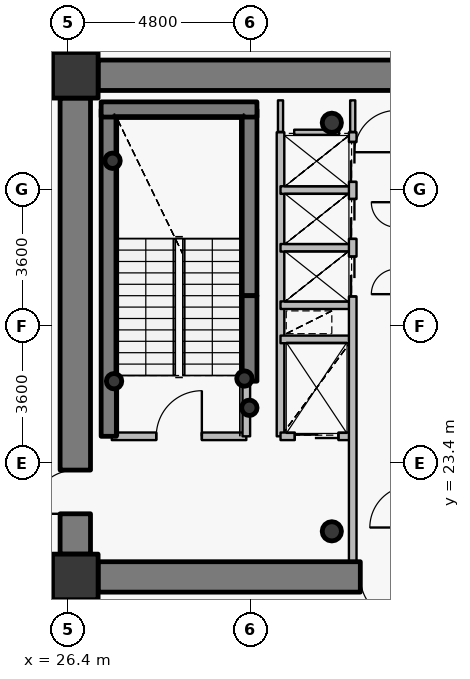
"""IFC4 building model, lengths in metres.
Left out: names, types, materials, properties, quantities, classifications, styles, units other than length and angle.
Written with IfcOpenShell. Run it as: python <this file> out.ifc"""

import sys

from ifc_helpers import new_model, si_unit, direction, frame, frame_2d, origin, origin_2d, place, context, subcontext, project, spatial, rectangle, hollow_circle, extrude, source, transform, mapped, element, fill, save


model = new_model("IFC4")
c1 = context("Model", 3, precision=1e-05, world=origin(), true_north=direction((0.0, 1.0)))
c2 = subcontext(c1, "Body", "Model", "MODEL_VIEW")
j1 = project(units=[si_unit("LENGTHUNIT", "METRE"), si_unit("PLANEANGLEUNIT", "RADIAN")], contexts=[c1])
p1 = place(None, origin())
s1 = spatial("IfcSite", under=j1, at=p1, CompositionType="ELEMENT")
p2 = place(p1, origin())
s2 = spatial("IfcBuilding", under=s1, at=p2, CompositionType="ELEMENT")
p3 = place(p2, frame((0.0, 0.0, 178.65)))
s3 = spatial("IfcBuildingStorey", under=s2, at=p3, CompositionType="ELEMENT", Elevation=178.65)
for number, where, z_axis, x_axis in (
    (1, (26.6, 20.4, 0.0), (0.0, 0.0, 1.0), (1.0, 0.0, 0.0)),
    (2, (26.6, 33.6, 0.0), (0.0, 0.0, 1.0), (1.0, 0.0, 0.0)),
):
    element("IfcColumn", number, at=place(p3, frame(where, z_axis=z_axis, x_axis=x_axis)), inside=s3, PredefinedType="COLUMN", context=c2, shape_type="SweptSolid", body=[
        extrude(rectangle(XDim=1.2, YDim=1.2, at=origin_2d()), origin(), (0.0, 0.0, 1.0), 3.75),
    ])
for number, where, z_axis, x_axis in (
    (3, (33.35, 21.6, 0.0), (0.0, 0.0, 1.0), (1.0, 0.0, 0.0)),
    (4, (33.35, 32.35, 0.0), (0.0, 0.0, 1.0), (1.0, 0.0, 0.0)),
):
    element("IfcColumn", number, at=place(p3, frame(where, z_axis=z_axis, x_axis=x_axis)), inside=s3, PredefinedType="COLUMN", context=c2, shape_type="SweptSolid", body=[
        extrude(hollow_circle(Radius=0.254, WallThickness=0.02, at=origin_2d()), origin(), (0.0, 0.0, 1.0), 3.75),
    ])
p4 = place(p3, frame((27.48, 24.1, 0.0), z_axis=(0.0, 0.0, 1.0), x_axis=(0.0, 1.0, 0.0)))
e5 = element("IfcWall", 5, at=p4, inside=s3, PredefinedType="SHEAR", context=c2, shape_type="SweptSolid", body=[
    extrude(rectangle(XDim=8.6, YDim=0.4, at=frame_2d((4.3, 0.0))), origin(), (0.0, 0.0, 1.0), 3.75),
])
p5 = place(p3, frame((31.18, 27.8, 0.0), z_axis=(0.0, 0.0, 1.0), x_axis=(0.0, 1.0, 0.0)))
e6 = element("IfcWall", 6, at=p5, inside=s3, PredefinedType="SHEAR", context=c2, shape_type="SweptSolid", body=[
    extrude(rectangle(XDim=4.9, YDim=0.4, at=frame_2d((2.45, 0.0))), origin(), (0.0, 0.0, 1.0), 3.75),
])
p6 = place(p3, frame((27.28, 32.7, 0.0), z_axis=(0.0, 0.0, 1.0), x_axis=(1.0, 0.0, 0.0)))
e7 = element("IfcWall", 7, at=p6, inside=s3, PredefinedType="SHEAR", context=c2, shape_type="SweptSolid", body=[
    extrude(rectangle(XDim=4.1, YDim=0.4, at=frame_2d((2.05, 0.0))), origin(), (0.0, 0.0, 1.0), 3.75),
])
for number, where, z_axis, x_axis in (
    (8, (27.58, 31.35, 0.0), (0.0, 0.0, 1.0), (1.0, 0.0, 0.0)),
    (9, (31.05, 25.62, 0.0), (0.0, 0.0, 1.0), (1.0, 0.0, 0.0)),
    (10, (31.18, 24.85, 0.0), (0.0, 0.0, 1.0), (1.0, 0.0, 0.0)),
    (11, (27.62, 25.55, 0.0), (0.0, 0.0, 1.0), (1.0, 0.0, 0.0)),
):
    element("IfcColumn", number, at=place(p3, frame(where, z_axis=z_axis, x_axis=x_axis)), inside=s3, PredefinedType="COLUMN", context=c2, shape_type="SweptSolid", body=[
        extrude(hollow_circle(Radius=0.203, WallThickness=0.016, at=origin_2d()), origin(), (0.0, 0.0, 1.0), 3.75),
    ])
p7 = place(p3, frame((27.2, 33.6, 0.0), z_axis=(0.0, 0.0, 1.0), x_axis=(1.0, 0.0, 0.0)))
e12 = element("IfcWall", 12, at=p7, inside=s3, PredefinedType="SHEAR", context=c2, shape_type="SweptSolid", body=[
    extrude(rectangle(XDim=17.6, YDim=0.8, at=frame_2d((8.8, 0.0))), origin(), (0.0, 0.0, 1.0), 2.95),
])
p8 = place(p7, frame((13.45, 0.0, 0.0)))
e13 = element("IfcOpeningElement", 13, at=p8, cuts=e12, PredefinedType="OPENING", context=c2, shape_type="SweptSolid", body=[
    extrude(rectangle(XDim=1.15, YDim=2.15, at=origin_2d()), frame((0.575, 0.41, 1.075), z_axis=(0.0, -1.0, 0.0), x_axis=(1.0, 0.0, 0.0)), (0.0, 0.0, 1.0), 0.82),
])
p9 = place(p3, frame((44.8, 20.4, 0.0), z_axis=(0.0, 0.0, 1.0), x_axis=(-1.0, 0.0, 0.0)))
e14 = element("IfcWall", 14, at=p9, inside=s3, PredefinedType="SHEAR", context=c2, shape_type="SweptSolid", body=[
    extrude(rectangle(XDim=17.6, YDim=0.8, at=frame_2d((8.8, 0.0))), origin(), (0.0, 0.0, 1.0), 2.95),
])
p10 = place(p9, frame((9.55, 0.0, 0.0)))
e15 = element("IfcOpeningElement", 15, at=p10, cuts=e14, PredefinedType="OPENING", context=c2, shape_type="SweptSolid", body=[
    extrude(rectangle(XDim=1.15, YDim=2.15, at=origin_2d()), frame((0.575, 0.41, 1.075), z_axis=(0.0, -1.0, 0.0), x_axis=(1.0, 0.0, 0.0)), (0.0, 0.0, 1.0), 0.82),
])
p11 = place(p3, frame((26.6, 21.0, 0.0), z_axis=(0.0, 0.0, 1.0), x_axis=(0.0, 1.0, 0.0)))
e16 = element("IfcWall", 16, at=p11, inside=s3, PredefinedType="SHEAR", context=c2, shape_type="SweptSolid", body=[
    extrude(rectangle(XDim=12.0, YDim=0.8, at=frame_2d((6.0, 0.0))), origin(), (0.0, 0.0, 1.0), 2.95),
])
p12 = place(p11, frame((1.061, 0.0, 0.0)))
e17 = element("IfcOpeningElement", 17, at=p12, cuts=e16, PredefinedType="OPENING", context=c2, shape_type="SweptSolid", body=[
    extrude(rectangle(XDim=1.15, YDim=2.15, at=origin_2d()), frame((0.575, 0.41, 1.075), z_axis=(0.0, -1.0, 0.0), x_axis=(1.0, 0.0, 0.0)), (0.0, 0.0, 1.0), 0.82),
])
p13 = place(p3, frame((31.18, 25.55, 0.0), z_axis=(0.0, 0.0, 1.0), x_axis=(0.0, 1.0, 0.0)))
e18 = element("IfcWall", 18, at=p13, inside=s3, PredefinedType="SHEAR", context=c2, shape_type="SweptSolid", body=[
    extrude(rectangle(XDim=2.25, YDim=0.4, at=frame_2d((1.125, 0.0))), origin(), (0.0, 0.0, 1.0), 3.1),
])
p14 = place(p3, frame((27.56, 24.1, 0.0), z_axis=(0.0, 0.0, 1.0), x_axis=(1.0, 0.0, 0.0)))
e19 = element("IfcWall", 19, at=p14, inside=s3, PredefinedType="PARTITIONING", context=c2, shape_type="SweptSolid", body=[
    extrude(rectangle(XDim=3.54, YDim=0.2, at=frame_2d((1.77, 0.0))), origin(), (0.0, 0.0, 1.0), 3.5),
])
p15 = place(p14, frame((1.17, 0.0, 0.0)))
e20 = element("IfcOpeningElement", 20, at=p15, cuts=e19, PredefinedType="OPENING", context=c2, shape_type="SweptSolid", body=[
    extrude(rectangle(XDim=1.2, YDim=2.15, at=origin_2d()), frame((0.6, 0.11, 1.075), z_axis=(0.0, -1.0, 0.0), x_axis=(1.0, 0.0, 0.0)), (0.0, 0.0, 1.0), 0.22),
])
p16 = place(p3, frame((31.1, 24.1, 0.0), z_axis=(0.0, 0.0, 1.0), x_axis=(0.0, 1.0, 0.0)))
e21 = element("IfcWall", 21, at=p16, inside=s3, PredefinedType="PARTITIONING", context=c2, shape_type="SweptSolid", body=[
    extrude(rectangle(XDim=1.44, YDim=0.2, at=frame_2d((0.72, 0.0))), origin(), (0.0, 0.0, 1.0), 3.5),
])
p17 = place(p3, frame((32.0, 24.1, 0.0), z_axis=(0.0, 0.0, 1.0), x_axis=(0.0, 1.0, 0.0)))
e22 = element("IfcWall", 22, at=p17, inside=s3, PredefinedType="PARTITIONING", context=c2, shape_type="SweptSolid", body=[
    extrude(rectangle(XDim=8.0, YDim=0.2, at=frame_2d((4.0, 0.0))), origin(), (0.0, 0.0, 1.0), 3.5),
])
p18 = place(p3, frame((32.0, 24.1, 0.0), z_axis=(0.0, 0.0, 1.0), x_axis=(1.0, 0.0, 0.0)))
e23 = element("IfcWall", 23, at=p18, inside=s3, PredefinedType="PARTITIONING", context=c2, shape_type="SweptSolid", body=[
    extrude(rectangle(XDim=1.9, YDim=0.2, at=frame_2d((0.95, 0.0))), origin(), (0.0, 0.0, 1.0), 3.085),
])
p19 = place(p18, frame((0.375, 0.0, 0.0)))
e24 = element("IfcOpeningElement", 24, at=p19, cuts=e23, PredefinedType="OPENING", context=c2, shape_type="SweptSolid", body=[
    extrude(rectangle(XDim=1.15, YDim=2.15, at=origin_2d()), frame((0.575, 0.11, 1.075), z_axis=(0.0, -1.0, 0.0), x_axis=(1.0, 0.0, 0.0)), (0.0, 0.0, 1.0), 0.22),
])
for number, where, z_axis, x_axis in (
    (25, (32.0, 26.65, 0.0), (0.0, 0.0, 1.0), (1.0, 0.0, 0.0)),
    (26, (32.0, 27.55, 0.0), (0.0, 0.0, 1.0), (1.0, 0.0, 0.0)),
    (27, (32.0, 29.06, 0.0), (0.0, 0.0, 1.0), (1.0, 0.0, 0.0)),
    (28, (32.0, 30.58, 0.0), (0.0, 0.0, 1.0), (1.0, 0.0, 0.0)),
):
    element("IfcWall", number, at=place(p3, frame(where, z_axis=z_axis, x_axis=x_axis)), inside=s3, PredefinedType="PARTITIONING", context=c2, shape_type="SweptSolid", body=[
        extrude(rectangle(XDim=1.9, YDim=0.2, at=frame_2d((0.95, 0.0))), origin(), (0.0, 0.0, 1.0), 3.085),
    ])
p20 = place(p3, frame((33.9, 20.8, 0.0), z_axis=(0.0, 0.0, 1.0), x_axis=(0.0, 1.0, 0.0)))
e29 = element("IfcWall", 29, at=p20, inside=s3, PredefinedType="PARTITIONING", context=c2, shape_type="SweptSolid", body=[
    extrude(rectangle(XDim=11.3, YDim=0.2, at=frame_2d((5.65, 0.0))), origin(), (0.0, 0.0, 1.0), 3.085),
])
p21 = place(p20, frame((6.98, 0.0, 0.0)))
e30 = element("IfcOpeningElement", 30, at=p21, cuts=e29, PredefinedType="OPENING", context=c2, shape_type="SweptSolid", body=[
    extrude(rectangle(XDim=1.05, YDim=2.15, at=origin_2d()), frame((0.525, 0.11, 1.075), z_axis=(0.0, -1.0, 0.0), x_axis=(1.0, 0.0, 0.0)), (0.0, 0.0, 1.0), 0.22),
])
p22 = place(p20, frame((8.495, 0.0, 0.0)))
e31 = element("IfcOpeningElement", 31, at=p22, cuts=e29, PredefinedType="OPENING", context=c2, shape_type="SweptSolid", body=[
    extrude(rectangle(XDim=1.05, YDim=2.15, at=origin_2d()), frame((0.525, 0.11, 1.075), z_axis=(0.0, -1.0, 0.0), x_axis=(1.0, 0.0, 0.0)), (0.0, 0.0, 1.0), 0.22),
])
p23 = place(p20, frame((9.995, 0.0, 0.0)))
e32 = element("IfcOpeningElement", 32, at=p23, cuts=e29, PredefinedType="OPENING", context=c2, shape_type="SweptSolid", body=[
    extrude(rectangle(XDim=1.05, YDim=2.15, at=origin_2d()), frame((0.525, 0.11, 1.075), z_axis=(0.0, -1.0, 0.0), x_axis=(1.0, 0.0, 0.0)), (0.0, 0.0, 1.0), 0.22),
])
p24 = place(p3, frame((32.36, 32.1, 0.0), z_axis=(0.0, 0.0, 1.0), x_axis=(1.0, 0.0, 0.0)))
e33 = element("IfcWall", 33, at=p24, inside=s3, PredefinedType="PARTITIONING", context=c2, shape_type="SweptSolid", body=[
    extrude(rectangle(XDim=1.18, YDim=0.135, at=frame_2d((0.59, 0.0))), origin(), (0.0, 0.0, 1.0), 3.085),
])
p25 = place(p3, frame((32.0, 32.94, 0.0), z_axis=(0.0, 0.0, 1.0), x_axis=(0.0, -1.0, 0.0)))
e34 = element("IfcWall", 34, at=p25, inside=s3, PredefinedType="PARTITIONING", context=c2, shape_type="SweptSolid", body=[
    extrude(rectangle(XDim=0.83, YDim=0.135, at=frame_2d((0.415, 0.0))), origin(), (0.0, 0.0, 1.0), 3.035),
])
p26 = place(p3, frame((33.9, 32.11, 0.0), z_axis=(0.0, 0.0, 1.0), x_axis=(0.0, 1.0, 0.0)))
e35 = element("IfcWall", 35, at=p26, inside=s3, PredefinedType="PARTITIONING", context=c2, shape_type="SweptSolid", body=[
    extrude(rectangle(XDim=0.83, YDim=0.135, at=frame_2d((0.415, 0.0))), origin(), (0.0, 0.0, 1.0), 3.085),
])
p27 = place(p3, frame((27.19, 34.0, 0.0), z_axis=(0.0, 0.0, 1.0), x_axis=(-1.0, 0.0, 0.0)))
e36 = element("IfcWall", 36, at=p27, inside=s3, PredefinedType="PARTITIONING", context=c2, shape_type="SweptSolid", body=[
    extrude(rectangle(XDim=0.99, YDim=0.135, at=frame_2d((0.495, 0.0))), origin(), (0.0, 0.0, 1.0), 2.935),
])
p28 = place(p3, frame((26.2, 33.692, 0.0), z_axis=(0.0, 0.0, 1.0), x_axis=(0.0, -1.0, 0.0)))
e37 = element("IfcWall", 37, at=p28, inside=s3, PredefinedType="PARTITIONING", context=c2, shape_type="SweptSolid", body=[
    extrude(rectangle(XDim=0.682, YDim=0.135, at=frame_2d((0.341, 0.0))), origin(), (0.0, 0.0, 1.0), 3.5),
])
p29 = place(p3, frame((26.2, 20.99, 0.0), z_axis=(0.0, 0.0, 1.0), x_axis=(0.0, -1.0, 0.0)))
e38 = element("IfcWall", 38, at=p29, inside=s3, PredefinedType="PARTITIONING", context=c2, shape_type="SweptSolid", body=[
    extrude(rectangle(XDim=0.99, YDim=0.135, at=frame_2d((0.495, 0.0))), origin(), (0.0, 0.0, 1.0), 3.5),
])
p30 = place(p3, frame((26.508, 20.0, 0.0), z_axis=(0.0, 0.0, 1.0), x_axis=(1.0, 0.0, 0.0)))
e39 = element("IfcWall", 39, at=p30, inside=s3, PredefinedType="PARTITIONING", context=c2, shape_type="SweptSolid", body=[
    extrude(rectangle(XDim=0.682, YDim=0.135, at=frame_2d((0.341, 0.0))), origin(), (0.0, 0.0, 1.0), 2.935),
])
m1 = source(origin(), c2, "Body", "SweptSolid", [
    extrude(rectangle(XDim=1.15, YDim=2.15, at=origin_2d()), frame((0.575, 0.025, 1.075), z_axis=(0.0, -1.0, 0.0), x_axis=(1.0, 0.0, 0.0)), (0.0, 0.0, 1.0), 0.05),
])
p31 = place(p12, origin())
e40 = element("IfcDoor", 40, at=p31, inside=s3, OperationType="SINGLE_SWING_LEFT", PredefinedType="DOOR", context=c2, shape_type="MappedRepresentation", body=[
    mapped(m1, transform((0.0, 0.0, 0.0), x_axis=(1.0, 0.0, 0.0), y_axis=(0.0, 1.0, 0.0), z_axis=(0.0, 0.0, 1.0), scale=1.0)),
])
fill(e17, e40)
p32 = place(p10, origin())
e41 = element("IfcDoor", 41, at=p32, inside=s3, OperationType="SINGLE_SWING_LEFT", PredefinedType="DOOR", context=c2, shape_type="MappedRepresentation", body=[
    mapped(m1, transform((0.0, 0.0, 0.0), x_axis=(1.0, 0.0, 0.0), y_axis=(0.0, 1.0, 0.0), z_axis=(0.0, 0.0, 1.0), scale=1.0)),
])
fill(e15, e41)
m2 = source(origin(), c2, "Body", "SweptSolid", [
    extrude(rectangle(XDim=1.2, YDim=2.15, at=origin_2d()), frame((0.6, 0.025, 1.075), z_axis=(0.0, -1.0, 0.0), x_axis=(1.0, 0.0, 0.0)), (0.0, 0.0, 1.0), 0.05),
])
p33 = place(p15, origin())
e42 = element("IfcDoor", 42, at=p33, inside=s3, OperationType="SINGLE_SWING_RIGHT", PredefinedType="DOOR", context=c2, shape_type="MappedRepresentation", body=[
    mapped(m2, transform((0.0, 0.0, 0.0), x_axis=(1.0, 0.0, 0.0), y_axis=(0.0, 1.0, 0.0), z_axis=(0.0, 0.0, 1.0), scale=1.0)),
])
fill(e20, e42)
m3 = source(origin(), c2, "Body", "SweptSolid", [
    extrude(rectangle(XDim=1.15, YDim=2.15, at=origin_2d()), frame((0.575, 0.025, 1.075), z_axis=(0.0, -1.0, 0.0), x_axis=(1.0, 0.0, 0.0)), (0.0, 0.0, 1.0), 0.05),
])
p34 = place(p19, origin())
e43 = element("IfcDoor", 43, at=p34, inside=s3, OperationType="DOUBLE_DOOR_SLIDING", PredefinedType="USERDEFINED", context=c2, shape_type="MappedRepresentation", body=[
    mapped(m3, transform((0.0, 0.0, 0.0), x_axis=(1.0, 0.0, 0.0), y_axis=(0.0, 1.0, 0.0), z_axis=(0.0, 0.0, 1.0), scale=1.0)),
])
fill(e24, e43)
m4 = source(origin(), c2, "Body", "SweptSolid", [
    extrude(rectangle(XDim=1.05, YDim=2.15, at=origin_2d()), frame((0.525, 0.025, 1.075), z_axis=(0.0, -1.0, 0.0), x_axis=(1.0, 0.0, 0.0)), (0.0, 0.0, 1.0), 0.05),
])
p35 = place(p21, origin())
e44 = element("IfcDoor", 44, at=p35, inside=s3, OperationType="DOUBLE_DOOR_SLIDING", PredefinedType="USERDEFINED", context=c2, shape_type="MappedRepresentation", body=[
    mapped(m4, transform((0.0, 0.0, 0.0), x_axis=(1.0, 0.0, 0.0), y_axis=(0.0, 1.0, 0.0), z_axis=(0.0, 0.0, 1.0), scale=1.0)),
])
fill(e30, e44)
p36 = place(p22, origin())
e45 = element("IfcDoor", 45, at=p36, inside=s3, OperationType="DOUBLE_DOOR_SLIDING", PredefinedType="USERDEFINED", context=c2, shape_type="MappedRepresentation", body=[
    mapped(m4, transform((0.0, 0.0, 0.0), x_axis=(1.0, 0.0, 0.0), y_axis=(0.0, 1.0, 0.0), z_axis=(0.0, 0.0, 1.0), scale=1.0)),
])
fill(e31, e45)
p37 = place(p23, origin())
e46 = element("IfcDoor", 46, at=p37, inside=s3, OperationType="DOUBLE_DOOR_SLIDING", PredefinedType="USERDEFINED", context=c2, shape_type="MappedRepresentation", body=[
    mapped(m4, transform((0.0, 0.0, 0.0), x_axis=(1.0, 0.0, 0.0), y_axis=(0.0, 1.0, 0.0), z_axis=(0.0, 0.0, 1.0), scale=1.0)),
])
fill(e32, e46)
save(model, sys.argv[1])
